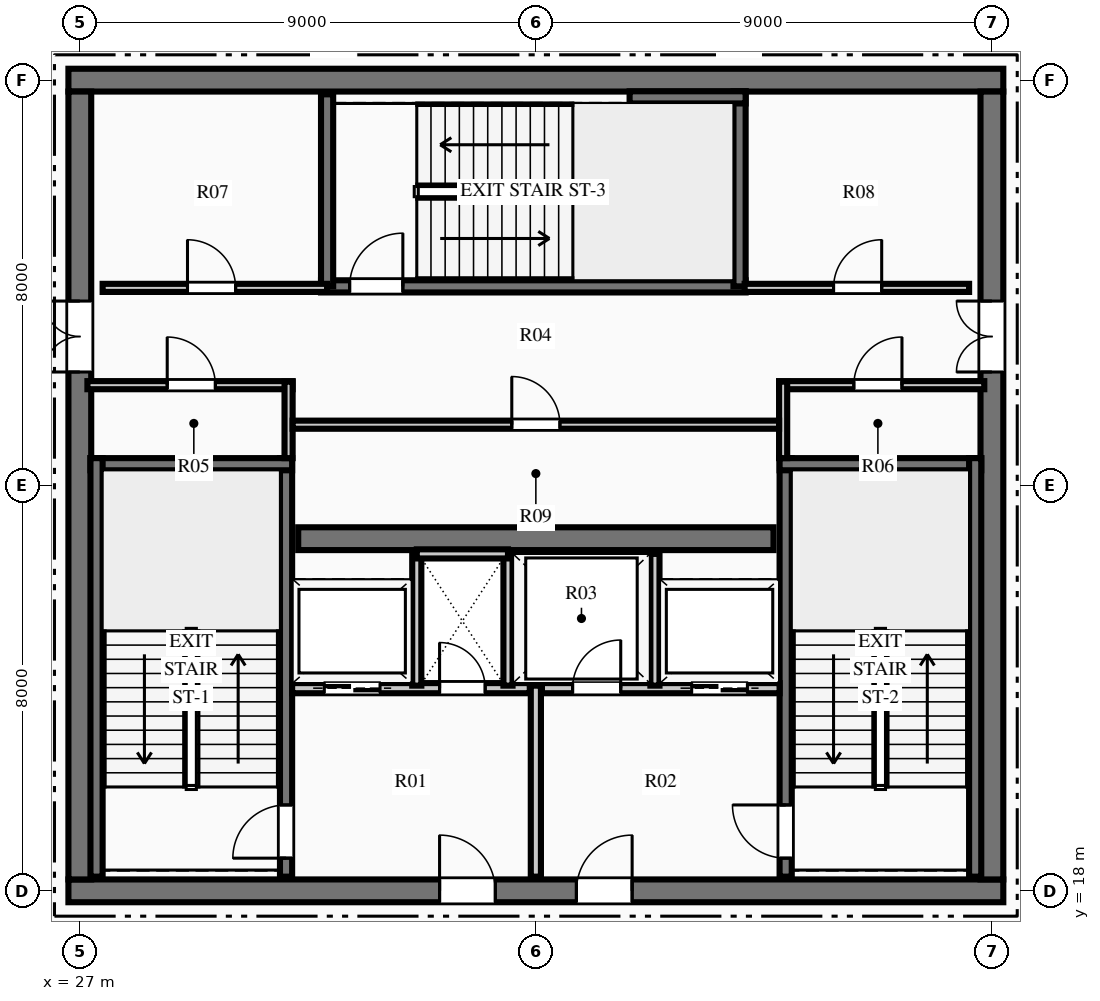
"""IFC4 building model, lengths in metres.
Left out: names, types, materials, properties, quantities, classifications, styles, units other than length and angle.
Written with IfcOpenShell. Run it as: python <this file> out.ifc"""

import sys

from ifc_helpers import new_model, si_unit, direction, frame, frame_2d, origin, place, context, subcontext, project, spatial, rectangle, extrude, element, fill, save


model = new_model("IFC4")
c1 = context("Model", 3, precision=1e-05, world=origin(), true_north=direction((0.0, 1.0)))
c2 = subcontext(c1, "Body", "Model", "MODEL_VIEW")
j1 = project(units=[si_unit("LENGTHUNIT", "METRE"), si_unit("PLANEANGLEUNIT", "RADIAN")], contexts=[c1])
p1 = place(None, origin())
s1 = spatial("IfcSite", under=j1, at=p1, CompositionType="ELEMENT")
p2 = place(p1, origin())
s2 = spatial("IfcBuilding", under=s1, at=p2, CompositionType="ELEMENT")
p3 = place(p2, frame((0.0, 0.0, 356.4)))
s3 = spatial("IfcBuildingStorey", under=s2, at=p3, CompositionType="ELEMENT", Elevation=356.4)
p4 = place(p3, frame((26.775, 18.0, 0.0), z_axis=(0.0, 0.0, 1.0), x_axis=(1.0, 0.0, 0.0)))
e1 = element("IfcWall", 1, at=p4, inside=s3, PredefinedType="SHEAR", context=c2, shape_type="SweptSolid", body=[
    extrude(rectangle(XDim=18.45, YDim=0.45, at=frame_2d((9.225, 0.0))), origin(), (0.0, 0.0, 1.0), 4.2),
])
p5 = place(p4, frame((7.325, 0.0, 0.0)))
e2 = element("IfcOpeningElement", 2, at=p5, cuts=e1, PredefinedType="OPENING", context=c2, shape_type="SweptSolid", body=[
    extrude(rectangle(XDim=1.1, YDim=2.15, at=frame_2d((0.55, 1.075))), frame((0.0, 0.235, 0.0), z_axis=(0.0, -1.0, 0.0), x_axis=(1.0, 0.0, 0.0)), (0.0, 0.0, 1.0), 0.47),
])
p6 = place(p4, frame((10.025, 0.0, 0.0)))
e3 = element("IfcOpeningElement", 3, at=p6, cuts=e1, PredefinedType="OPENING", context=c2, shape_type="SweptSolid", body=[
    extrude(rectangle(XDim=1.1, YDim=2.15, at=frame_2d((0.55, 1.075))), frame((0.0, 0.235, 0.0), z_axis=(0.0, -1.0, 0.0), x_axis=(1.0, 0.0, 0.0)), (0.0, 0.0, 1.0), 0.47),
])
p7 = place(p3, frame((26.775, 34.0, 0.0), z_axis=(0.0, 0.0, 1.0), x_axis=(1.0, 0.0, 0.0)))
e4 = element("IfcWall", 4, at=p7, inside=s3, PredefinedType="SHEAR", context=c2, shape_type="SweptSolid", body=[
    extrude(rectangle(XDim=18.45, YDim=0.45, at=frame_2d((9.225, 0.0))), origin(), (0.0, 0.0, 1.0), 4.2),
])
p8 = place(p3, frame((27.0, 18.225, 0.0), z_axis=(0.0, 0.0, 1.0), x_axis=(0.0, 1.0, 0.0)))
e5 = element("IfcWall", 5, at=p8, inside=s3, PredefinedType="SHEAR", context=c2, shape_type="SweptSolid", body=[
    extrude(rectangle(XDim=15.55, YDim=0.45, at=frame_2d((7.775, 0.0))), origin(), (0.0, 0.0, 1.0), 4.2),
])
p9 = place(p8, frame((10.015, 0.0, 0.0)))
e6 = element("IfcOpeningElement", 6, at=p9, cuts=e5, PredefinedType="OPENING", context=c2, shape_type="SweptSolid", body=[
    extrude(rectangle(XDim=1.4, YDim=2.2, at=frame_2d((0.7, 1.1))), frame((0.0, 0.235, 0.0), z_axis=(0.0, -1.0, 0.0), x_axis=(1.0, 0.0, 0.0)), (0.0, 0.0, 1.0), 0.47),
])
p10 = place(p3, frame((45.0, 18.225, 0.0), z_axis=(0.0, 0.0, 1.0), x_axis=(0.0, 1.0, 0.0)))
e7 = element("IfcWall", 7, at=p10, inside=s3, PredefinedType="SHEAR", context=c2, shape_type="SweptSolid", body=[
    extrude(rectangle(XDim=15.55, YDim=0.45, at=frame_2d((7.775, 0.0))), origin(), (0.0, 0.0, 1.0), 4.2),
])
p11 = place(p10, frame((10.015, 0.0, 0.0)))
e8 = element("IfcOpeningElement", 8, at=p11, cuts=e7, PredefinedType="OPENING", context=c2, shape_type="SweptSolid", body=[
    extrude(rectangle(XDim=1.4, YDim=2.2, at=frame_2d((0.7, 1.1))), frame((0.0, 0.235, 0.0), z_axis=(0.0, -1.0, 0.0), x_axis=(1.0, 0.0, 0.0)), (0.0, 0.0, 1.0), 0.47),
])
p12 = place(p3, frame((31.31, 24.95, 0.0), z_axis=(0.0, 0.0, 1.0), x_axis=(1.0, 0.0, 0.0)))
e9 = element("IfcWall", 9, at=p12, inside=s3, PredefinedType="SHEAR", context=c2, shape_type="SweptSolid", body=[
    extrude(rectangle(XDim=9.38, YDim=0.45, at=frame_2d((4.69, 0.0))), origin(), (0.0, 0.0, 1.0), 4.2),
])
p13 = place(p3, frame((31.07, 18.28, 0.0), z_axis=(0.0, 0.0, 1.0), x_axis=(0.0, 1.0, 0.0)))
e10 = element("IfcWall", 10, at=p13, inside=s3, PredefinedType="SHEAR", context=c2, shape_type="SweptSolid", body=[
    extrude(rectangle(XDim=8.26, YDim=0.24, at=frame_2d((4.13, 0.0))), origin(), (0.0, 0.0, 1.0), 4.2),
])
p14 = place(p13, frame((0.365, 0.0, 0.0)))
e11 = element("IfcOpeningElement", 11, at=p14, cuts=e10, PredefinedType="OPENING", context=c2, shape_type="SweptSolid", body=[
    extrude(rectangle(XDim=1.05, YDim=2.15, at=frame_2d((0.525, 1.075))), frame((0.0, 0.13, 0.0), z_axis=(0.0, -1.0, 0.0), x_axis=(1.0, 0.0, 0.0)), (0.0, 0.0, 1.0), 0.26),
])
p15 = place(p3, frame((27.21, 26.42, 0.0), z_axis=(0.0, 0.0, 1.0), x_axis=(1.0, 0.0, 0.0)))
e12 = element("IfcWall", 12, at=p15, inside=s3, PredefinedType="SHEAR", context=c2, shape_type="SweptSolid", body=[
    extrude(rectangle(XDim=3.98, YDim=0.24, at=frame_2d((1.99, 0.0))), origin(), (0.0, 0.0, 1.0), 4.2),
])
p16 = place(p3, frame((27.33, 18.28, 0.0), z_axis=(0.0, 0.0, 1.0), x_axis=(0.0, 1.0, 0.0)))
e13 = element("IfcWall", 13, at=p16, inside=s3, PredefinedType="SHEAR", context=c2, shape_type="SweptSolid", body=[
    extrude(rectangle(XDim=8.26, YDim=0.24, at=frame_2d((4.13, 0.0))), origin(), (0.0, 0.0, 1.0), 4.2),
])
p17 = place(p3, frame((40.93, 18.28, 0.0), z_axis=(0.0, 0.0, 1.0), x_axis=(0.0, 1.0, 0.0)))
e14 = element("IfcWall", 14, at=p17, inside=s3, PredefinedType="SHEAR", context=c2, shape_type="SweptSolid", body=[
    extrude(rectangle(XDim=8.26, YDim=0.24, at=frame_2d((4.13, 0.0))), origin(), (0.0, 0.0, 1.0), 4.2),
])
p18 = place(p17, frame((0.365, 0.0, 0.0)))
e15 = element("IfcOpeningElement", 15, at=p18, cuts=e14, PredefinedType="OPENING", context=c2, shape_type="SweptSolid", body=[
    extrude(rectangle(XDim=1.05, YDim=2.15, at=frame_2d((0.525, 1.075))), frame((0.0, 0.13, 0.0), z_axis=(0.0, -1.0, 0.0), x_axis=(1.0, 0.0, 0.0)), (0.0, 0.0, 1.0), 0.26),
])
p19 = place(p3, frame((40.81, 26.42, 0.0), z_axis=(0.0, 0.0, 1.0), x_axis=(1.0, 0.0, 0.0)))
e16 = element("IfcWall", 16, at=p19, inside=s3, PredefinedType="SHEAR", context=c2, shape_type="SweptSolid", body=[
    extrude(rectangle(XDim=3.98, YDim=0.24, at=frame_2d((1.99, 0.0))), origin(), (0.0, 0.0, 1.0), 4.2),
])
p20 = place(p3, frame((44.67, 18.28, 0.0), z_axis=(0.0, 0.0, 1.0), x_axis=(0.0, 1.0, 0.0)))
e17 = element("IfcWall", 17, at=p20, inside=s3, PredefinedType="SHEAR", context=c2, shape_type="SweptSolid", body=[
    extrude(rectangle(XDim=8.26, YDim=0.24, at=frame_2d((4.13, 0.0))), origin(), (0.0, 0.0, 1.0), 4.2),
])
p21 = place(p3, frame((31.76, 29.93, 0.0), z_axis=(0.0, 0.0, 1.0), x_axis=(1.0, 0.0, 0.0)))
e18 = element("IfcWall", 18, at=p21, inside=s3, PredefinedType="SHEAR", context=c2, shape_type="SweptSolid", body=[
    extrude(rectangle(XDim=8.38, YDim=0.24, at=frame_2d((4.19, 0.0))), origin(), (0.0, 0.0, 1.0), 4.2),
])
p22 = place(p21, frame((0.565, 0.0, 0.0)))
e19 = element("IfcOpeningElement", 19, at=p22, cuts=e18, PredefinedType="OPENING", context=c2, shape_type="SweptSolid", body=[
    extrude(rectangle(XDim=1.05, YDim=2.15, at=frame_2d((0.525, 1.075))), frame((0.0, 0.13, 0.0), z_axis=(0.0, -1.0, 0.0), x_axis=(1.0, 0.0, 0.0)), (0.0, 0.0, 1.0), 0.26),
])
p23 = place(p3, frame((31.88, 29.93, 0.0), z_axis=(0.0, 0.0, 1.0), x_axis=(0.0, 1.0, 0.0)))
e20 = element("IfcWall", 20, at=p23, inside=s3, PredefinedType="SHEAR", context=c2, shape_type="SweptSolid", body=[
    extrude(rectangle(XDim=3.79, YDim=0.24, at=frame_2d((1.895, 0.0))), origin(), (0.0, 0.0, 1.0), 4.2),
])
p24 = place(p3, frame((40.02, 29.93, 0.0), z_axis=(0.0, 0.0, 1.0), x_axis=(0.0, 1.0, 0.0)))
e21 = element("IfcWall", 21, at=p24, inside=s3, PredefinedType="SHEAR", context=c2, shape_type="SweptSolid", body=[
    extrude(rectangle(XDim=3.85, YDim=0.24, at=frame_2d((1.925, 0.0))), origin(), (0.0, 0.0, 1.0), 4.2),
])
p25 = place(p3, frame((37.85, 33.66, 0.0), z_axis=(0.0, 0.0, 1.0), x_axis=(1.0, 0.0, 0.0)))
e22 = element("IfcWall", 22, at=p25, inside=s3, PredefinedType="SHEAR", context=c2, shape_type="SweptSolid", body=[
    extrude(rectangle(XDim=2.29, YDim=0.24, at=frame_2d((1.145, 0.0))), origin(), (0.0, 0.0, 1.0), 4.2),
])
p26 = place(p3, frame((36.0, 18.28, 0.0), z_axis=(0.0, 0.0, 1.0), x_axis=(0.0, 1.0, 0.0)))
e23 = element("IfcWall", 23, at=p26, inside=s3, PredefinedType="PARTITIONING", context=c2, shape_type="SweptSolid", body=[
    extrude(rectangle(XDim=3.77, YDim=0.2, at=frame_2d((1.885, 0.0))), origin(), (0.0, 0.0, 1.0), 3.93),
])
p27 = place(p3, frame((31.19, 22.0, 0.0), z_axis=(0.0, 0.0, 1.0), x_axis=(1.0, 0.0, 0.0)))
e24 = element("IfcWall", 24, at=p27, inside=s3, PredefinedType="PARTITIONING", context=c2, shape_type="SweptSolid", body=[
    extrude(rectangle(XDim=4.69, YDim=0.2, at=frame_2d((2.345, 0.0))), origin(), (0.0, 0.0, 1.0), 3.93),
])
p28 = place(p27, frame((2.91, 0.0, 0.0)))
e25 = element("IfcOpeningElement", 25, at=p28, cuts=e24, PredefinedType="OPENING", context=c2, shape_type="SweptSolid", body=[
    extrude(rectangle(XDim=0.9, YDim=2.15, at=frame_2d((0.45, 1.075))), frame((0.0, 0.11, 0.0), z_axis=(0.0, -1.0, 0.0), x_axis=(1.0, 0.0, 0.0)), (0.0, 0.0, 1.0), 0.22),
])
p29 = place(p27, frame((0.635, 0.0, 0.0)))
e26 = element("IfcOpeningElement", 26, at=p29, cuts=e24, PredefinedType="OPENING", context=c2, shape_type="SweptSolid", body=[
    extrude(rectangle(XDim=1.1, YDim=2.15, at=frame_2d((0.55, 1.075))), frame((0.0, 0.11, 0.0), z_axis=(0.0, -1.0, 0.0), x_axis=(1.0, 0.0, 0.0)), (0.0, 0.0, 1.0), 0.22),
])
p30 = place(p3, frame((36.12, 22.0, 0.0), z_axis=(0.0, 0.0, 1.0), x_axis=(1.0, 0.0, 0.0)))
e27 = element("IfcWall", 27, at=p30, inside=s3, PredefinedType="PARTITIONING", context=c2, shape_type="SweptSolid", body=[
    extrude(rectangle(XDim=4.69, YDim=0.2, at=frame_2d((2.345, 0.0))), origin(), (0.0, 0.0, 1.0), 3.93),
])
p31 = place(p30, frame((0.605, 0.0, 0.0)))
e28 = element("IfcOpeningElement", 28, at=p31, cuts=e27, PredefinedType="OPENING", context=c2, shape_type="SweptSolid", body=[
    extrude(rectangle(XDim=0.95, YDim=2.15, at=frame_2d((0.475, 1.075))), frame((0.0, 0.11, 0.0), z_axis=(0.0, -1.0, 0.0), x_axis=(1.0, 0.0, 0.0)), (0.0, 0.0, 1.0), 0.22),
])
p32 = place(p30, frame((2.955, 0.0, 0.0)))
e29 = element("IfcOpeningElement", 29, at=p32, cuts=e27, PredefinedType="OPENING", context=c2, shape_type="SweptSolid", body=[
    extrude(rectangle(XDim=1.1, YDim=2.15, at=frame_2d((0.55, 1.075))), frame((0.0, 0.11, 0.0), z_axis=(0.0, -1.0, 0.0), x_axis=(1.0, 0.0, 0.0)), (0.0, 0.0, 1.0), 0.22),
])
for number, where, z_axis, x_axis in (
    (30, (33.65, 22.05, 0.0), (0.0, 0.0, 1.0), (0.0, 1.0, 0.0)),
    (31, (35.45, 22.05, 0.0), (0.0, 0.0, 1.0), (0.0, 1.0, 0.0)),
):
    element("IfcWall", number, at=place(p3, frame(where, z_axis=z_axis, x_axis=x_axis)), inside=s3, PredefinedType="PARTITIONING", context=c2, shape_type="SweptSolid", body=[
        extrude(rectangle(XDim=2.6, YDim=0.18, at=frame_2d((1.3, 0.0))), origin(), (0.0, 0.0, 1.0), 3.93),
    ])
p33 = place(p3, frame((33.65, 24.65, 0.0), z_axis=(0.0, 0.0, 1.0), x_axis=(1.0, 0.0, 0.0)))
e32 = element("IfcWall", 32, at=p33, inside=s3, PredefinedType="PARTITIONING", context=c2, shape_type="SweptSolid", body=[
    extrude(rectangle(XDim=1.8, YDim=0.18, at=frame_2d((0.9, 0.0))), origin(), (0.0, 0.0, 1.0), 3.93),
])
p34 = place(p3, frame((38.35, 22.05, 0.0), z_axis=(0.0, 0.0, 1.0), x_axis=(0.0, 1.0, 0.0)))
e33 = element("IfcWall", 33, at=p34, inside=s3, PredefinedType="PARTITIONING", context=c2, shape_type="SweptSolid", body=[
    extrude(rectangle(XDim=2.6, YDim=0.18, at=frame_2d((1.3, 0.0))), origin(), (0.0, 0.0, 1.0), 3.93),
])
p35 = place(p3, frame((27.15, 27.98, 0.0), z_axis=(0.0, 0.0, 1.0), x_axis=(1.0, 0.0, 0.0)))
e34 = element("IfcWall", 34, at=p35, inside=s3, PredefinedType="PARTITIONING", context=c2, shape_type="SweptSolid", body=[
    extrude(rectangle(XDim=4.05, YDim=0.16, at=frame_2d((2.025, 0.0))), origin(), (0.0, 0.0, 1.0), 3.93),
])
p36 = place(p35, frame((1.575, 0.0, 0.0)))
e35 = element("IfcOpeningElement", 35, at=p36, cuts=e34, PredefinedType="OPENING", context=c2, shape_type="SweptSolid", body=[
    extrude(rectangle(XDim=0.95, YDim=2.15, at=frame_2d((0.475, 1.075))), frame((0.0, 0.09, 0.0), z_axis=(0.0, -1.0, 0.0), x_axis=(1.0, 0.0, 0.0)), (0.0, 0.0, 1.0), 0.18),
])
p37 = place(p3, frame((31.12, 26.54, 0.0), z_axis=(0.0, 0.0, 1.0), x_axis=(0.0, 1.0, 0.0)))
e36 = element("IfcWall", 36, at=p37, inside=s3, PredefinedType="PARTITIONING", context=c2, shape_type="SweptSolid", body=[
    extrude(rectangle(XDim=1.51, YDim=0.16, at=frame_2d((0.755, 0.0))), origin(), (0.0, 0.0, 1.0), 3.93),
])
p38 = place(p3, frame((40.8, 27.98, 0.0), z_axis=(0.0, 0.0, 1.0), x_axis=(1.0, 0.0, 0.0)))
e37 = element("IfcWall", 37, at=p38, inside=s3, PredefinedType="PARTITIONING", context=c2, shape_type="SweptSolid", body=[
    extrude(rectangle(XDim=4.05, YDim=0.16, at=frame_2d((2.025, 0.0))), origin(), (0.0, 0.0, 1.0), 3.93),
])
p39 = place(p38, frame((1.475, 0.0, 0.0)))
e38 = element("IfcOpeningElement", 38, at=p39, cuts=e37, PredefinedType="OPENING", context=c2, shape_type="SweptSolid", body=[
    extrude(rectangle(XDim=0.95, YDim=2.15, at=frame_2d((0.475, 1.075))), frame((0.0, 0.09, 0.0), z_axis=(0.0, -1.0, 0.0), x_axis=(1.0, 0.0, 0.0)), (0.0, 0.0, 1.0), 0.18),
])
p40 = place(p3, frame((40.88, 26.54, 0.0), z_axis=(0.0, 0.0, 1.0), x_axis=(0.0, 1.0, 0.0)))
e39 = element("IfcWall", 39, at=p40, inside=s3, PredefinedType="PARTITIONING", context=c2, shape_type="SweptSolid", body=[
    extrude(rectangle(XDim=1.51, YDim=0.16, at=frame_2d((0.755, 0.0))), origin(), (0.0, 0.0, 1.0), 3.93),
])
p41 = place(p3, frame((27.45, 29.9, 0.0), z_axis=(0.0, 0.0, 1.0), x_axis=(1.0, 0.0, 0.0)))
e40 = element("IfcWall", 40, at=p41, inside=s3, PredefinedType="PARTITIONING", context=c2, shape_type="SweptSolid", body=[
    extrude(rectangle(XDim=4.43, YDim=0.16, at=frame_2d((2.215, 0.0))), origin(), (0.0, 0.0, 1.0), 3.93),
])
p42 = place(p41, frame((1.675, 0.0, 0.0)))
e41 = element("IfcOpeningElement", 41, at=p42, cuts=e40, PredefinedType="OPENING", context=c2, shape_type="SweptSolid", body=[
    extrude(rectangle(XDim=0.95, YDim=2.15, at=frame_2d((0.475, 1.075))), frame((0.0, 0.09, 0.0), z_axis=(0.0, -1.0, 0.0), x_axis=(1.0, 0.0, 0.0)), (0.0, 0.0, 1.0), 0.18),
])
p43 = place(p3, frame((40.12, 29.9, 0.0), z_axis=(0.0, 0.0, 1.0), x_axis=(1.0, 0.0, 0.0)))
e42 = element("IfcWall", 42, at=p43, inside=s3, PredefinedType="PARTITIONING", context=c2, shape_type="SweptSolid", body=[
    extrude(rectangle(XDim=4.43, YDim=0.16, at=frame_2d((2.215, 0.0))), origin(), (0.0, 0.0, 1.0), 3.93),
])
p44 = place(p43, frame((1.755, 0.0, 0.0)))
e43 = element("IfcOpeningElement", 43, at=p44, cuts=e42, PredefinedType="OPENING", context=c2, shape_type="SweptSolid", body=[
    extrude(rectangle(XDim=0.95, YDim=2.15, at=frame_2d((0.475, 1.075))), frame((0.0, 0.09, 0.0), z_axis=(0.0, -1.0, 0.0), x_axis=(1.0, 0.0, 0.0)), (0.0, 0.0, 1.0), 0.18),
])
p45 = place(p3, frame((31.2, 27.2, 0.0), z_axis=(0.0, 0.0, 1.0), x_axis=(1.0, 0.0, 0.0)))
e44 = element("IfcWall", 44, at=p45, inside=s3, PredefinedType="PARTITIONING", context=c2, shape_type="SweptSolid", body=[
    extrude(rectangle(XDim=9.6, YDim=0.16, at=frame_2d((4.8, 0.0))), origin(), (0.0, 0.0, 1.0), 3.93),
])
p46 = place(p45, frame((4.325, 0.0, 0.0)))
e45 = element("IfcOpeningElement", 45, at=p46, cuts=e44, PredefinedType="OPENING", context=c2, shape_type="SweptSolid", body=[
    extrude(rectangle(XDim=0.95, YDim=2.15, at=frame_2d((0.475, 1.075))), frame((0.0, 0.09, 0.0), z_axis=(0.0, -1.0, 0.0), x_axis=(1.0, 0.0, 0.0)), (0.0, 0.0, 1.0), 0.18),
])
p47 = place(p31, origin())
e46 = element("IfcDoor", 46, at=p47, inside=s3, OperationType="SINGLE_SWING_RIGHT", PredefinedType="DOOR", context=c2, shape_type="SweptSolid", body=[
    extrude(rectangle(XDim=0.95, YDim=2.15, at=frame_2d((0.475, 1.075))), frame((0.0, 0.025, 0.0), z_axis=(0.0, -1.0, 0.0), x_axis=(1.0, 0.0, 0.0)), (0.0, 0.0, 1.0), 0.05),
])
fill(e28, e46)
p48 = place(p36, origin())
e47 = element("IfcDoor", 47, at=p48, inside=s3, OperationType="SINGLE_SWING_LEFT", PredefinedType="DOOR", context=c2, shape_type="SweptSolid", body=[
    extrude(rectangle(XDim=0.95, YDim=2.15, at=frame_2d((0.475, 1.075))), frame((0.0, 0.025, 0.0), z_axis=(0.0, -1.0, 0.0), x_axis=(1.0, 0.0, 0.0)), (0.0, 0.0, 1.0), 0.05),
])
fill(e35, e47)
p49 = place(p39, origin())
e48 = element("IfcDoor", 48, at=p49, inside=s3, OperationType="SINGLE_SWING_RIGHT", PredefinedType="DOOR", context=c2, shape_type="SweptSolid", body=[
    extrude(rectangle(XDim=0.95, YDim=2.15, at=frame_2d((0.475, 1.075))), frame((0.0, 0.025, 0.0), z_axis=(0.0, -1.0, 0.0), x_axis=(1.0, 0.0, 0.0)), (0.0, 0.0, 1.0), 0.05),
])
fill(e38, e48)
p50 = place(p42, origin())
e49 = element("IfcDoor", 49, at=p50, inside=s3, OperationType="SINGLE_SWING_LEFT", PredefinedType="DOOR", context=c2, shape_type="SweptSolid", body=[
    extrude(rectangle(XDim=0.95, YDim=2.15, at=frame_2d((0.475, 1.075))), frame((0.0, 0.025, 0.0), z_axis=(0.0, -1.0, 0.0), x_axis=(1.0, 0.0, 0.0)), (0.0, 0.0, 1.0), 0.05),
])
fill(e41, e49)
p51 = place(p44, origin())
e50 = element("IfcDoor", 50, at=p51, inside=s3, OperationType="SINGLE_SWING_RIGHT", PredefinedType="DOOR", context=c2, shape_type="SweptSolid", body=[
    extrude(rectangle(XDim=0.95, YDim=2.15, at=frame_2d((0.475, 1.075))), frame((0.0, 0.025, 0.0), z_axis=(0.0, -1.0, 0.0), x_axis=(1.0, 0.0, 0.0)), (0.0, 0.0, 1.0), 0.05),
])
fill(e43, e50)
p52 = place(p46, origin())
e51 = element("IfcDoor", 51, at=p52, inside=s3, OperationType="SINGLE_SWING_LEFT", PredefinedType="DOOR", context=c2, shape_type="SweptSolid", body=[
    extrude(rectangle(XDim=0.95, YDim=2.15, at=frame_2d((0.475, 1.075))), frame((0.0, 0.025, 0.0), z_axis=(0.0, -1.0, 0.0), x_axis=(1.0, 0.0, 0.0)), (0.0, 0.0, 1.0), 0.05),
])
fill(e45, e51)
p53 = place(p14, origin())
e52 = element("IfcDoor", 52, at=p53, inside=s3, OperationType="SINGLE_SWING_LEFT", PredefinedType="DOOR", context=c2, shape_type="SweptSolid", body=[
    extrude(rectangle(XDim=1.05, YDim=2.15, at=frame_2d((0.525, 1.075))), frame((0.0, 0.025, 0.0), z_axis=(0.0, -1.0, 0.0), x_axis=(1.0, 0.0, 0.0)), (0.0, 0.0, 1.0), 0.05),
])
fill(e11, e52)
p54 = place(p18, origin())
e53 = element("IfcDoor", 53, at=p54, inside=s3, OperationType="SINGLE_SWING_RIGHT", PredefinedType="DOOR", context=c2, shape_type="SweptSolid", body=[
    extrude(rectangle(XDim=1.05, YDim=2.15, at=frame_2d((0.525, 1.075))), frame((0.0, 0.025, 0.0), z_axis=(0.0, -1.0, 0.0), x_axis=(1.0, 0.0, 0.0)), (0.0, 0.0, 1.0), 0.05),
])
fill(e15, e53)
p55 = place(p22, origin())
e54 = element("IfcDoor", 54, at=p55, inside=s3, OperationType="SINGLE_SWING_RIGHT", PredefinedType="DOOR", context=c2, shape_type="SweptSolid", body=[
    extrude(rectangle(XDim=1.05, YDim=2.15, at=frame_2d((0.525, 1.075))), frame((0.0, 0.025, 0.0), z_axis=(0.0, -1.0, 0.0), x_axis=(1.0, 0.0, 0.0)), (0.0, 0.0, 1.0), 0.05),
])
fill(e19, e54)
p56 = place(p5, origin())
e55 = element("IfcDoor", 55, at=p56, inside=s3, OperationType="SINGLE_SWING_LEFT", PredefinedType="DOOR", context=c2, shape_type="SweptSolid", body=[
    extrude(rectangle(XDim=1.1, YDim=2.15, at=frame_2d((0.55, 1.075))), frame((0.0, 0.025, 0.0), z_axis=(0.0, -1.0, 0.0), x_axis=(1.0, 0.0, 0.0)), (0.0, 0.0, 1.0), 0.05),
])
fill(e2, e55)
p57 = place(p6, origin())
e56 = element("IfcDoor", 56, at=p57, inside=s3, OperationType="SINGLE_SWING_RIGHT", PredefinedType="DOOR", context=c2, shape_type="SweptSolid", body=[
    extrude(rectangle(XDim=1.1, YDim=2.15, at=frame_2d((0.55, 1.075))), frame((0.0, 0.025, 0.0), z_axis=(0.0, -1.0, 0.0), x_axis=(1.0, 0.0, 0.0)), (0.0, 0.0, 1.0), 0.05),
])
fill(e3, e56)
p58 = place(p28, origin())
e57 = element("IfcDoor", 57, at=p58, inside=s3, OperationType="SINGLE_SWING_LEFT", PredefinedType="DOOR", context=c2, shape_type="SweptSolid", body=[
    extrude(rectangle(XDim=0.9, YDim=2.15, at=frame_2d((0.45, 1.075))), frame((0.0, 0.025, 0.0), z_axis=(0.0, -1.0, 0.0), x_axis=(1.0, 0.0, 0.0)), (0.0, 0.0, 1.0), 0.05),
])
fill(e25, e57)
p59 = place(p9, origin())
e58 = element("IfcDoor", 58, at=p59, inside=s3, OperationType="DOUBLE_DOOR_SINGLE_SWING", PredefinedType="DOOR", context=c2, shape_type="SweptSolid", body=[
    extrude(rectangle(XDim=1.4, YDim=2.2, at=frame_2d((0.7, 1.1))), frame((0.0, 0.025, 0.0), z_axis=(0.0, -1.0, 0.0), x_axis=(1.0, 0.0, 0.0)), (0.0, 0.0, 1.0), 0.05),
])
fill(e6, e58)
p60 = place(p11, origin())
e59 = element("IfcDoor", 59, at=p60, inside=s3, OperationType="DOUBLE_DOOR_SINGLE_SWING", PredefinedType="DOOR", context=c2, shape_type="SweptSolid", body=[
    extrude(rectangle(XDim=1.4, YDim=2.2, at=frame_2d((0.7, 1.1))), frame((0.0, 0.025, 0.0), z_axis=(0.0, -1.0, 0.0), x_axis=(1.0, 0.0, 0.0)), (0.0, 0.0, 1.0), 0.05),
])
fill(e8, e59)
p61 = place(p29, origin())
e60 = element("IfcDoor", 60, at=p61, inside=s3, OperationType="SLIDING_TO_LEFT", PredefinedType="DOOR", context=c2, shape_type="SweptSolid", body=[
    extrude(rectangle(XDim=1.1, YDim=2.15, at=frame_2d((0.55, 1.075))), frame((0.0, 0.025, 0.0), z_axis=(0.0, -1.0, 0.0), x_axis=(1.0, 0.0, 0.0)), (0.0, 0.0, 1.0), 0.05),
])
fill(e26, e60)
p62 = place(p32, origin())
e61 = element("IfcDoor", 61, at=p62, inside=s3, OperationType="SLIDING_TO_LEFT", PredefinedType="DOOR", context=c2, shape_type="SweptSolid", body=[
    extrude(rectangle(XDim=1.1, YDim=2.15, at=frame_2d((0.55, 1.075))), frame((0.0, 0.025, 0.0), z_axis=(0.0, -1.0, 0.0), x_axis=(1.0, 0.0, 0.0)), (0.0, 0.0, 1.0), 0.05),
])
fill(e29, e61)
save(model, sys.argv[1])
